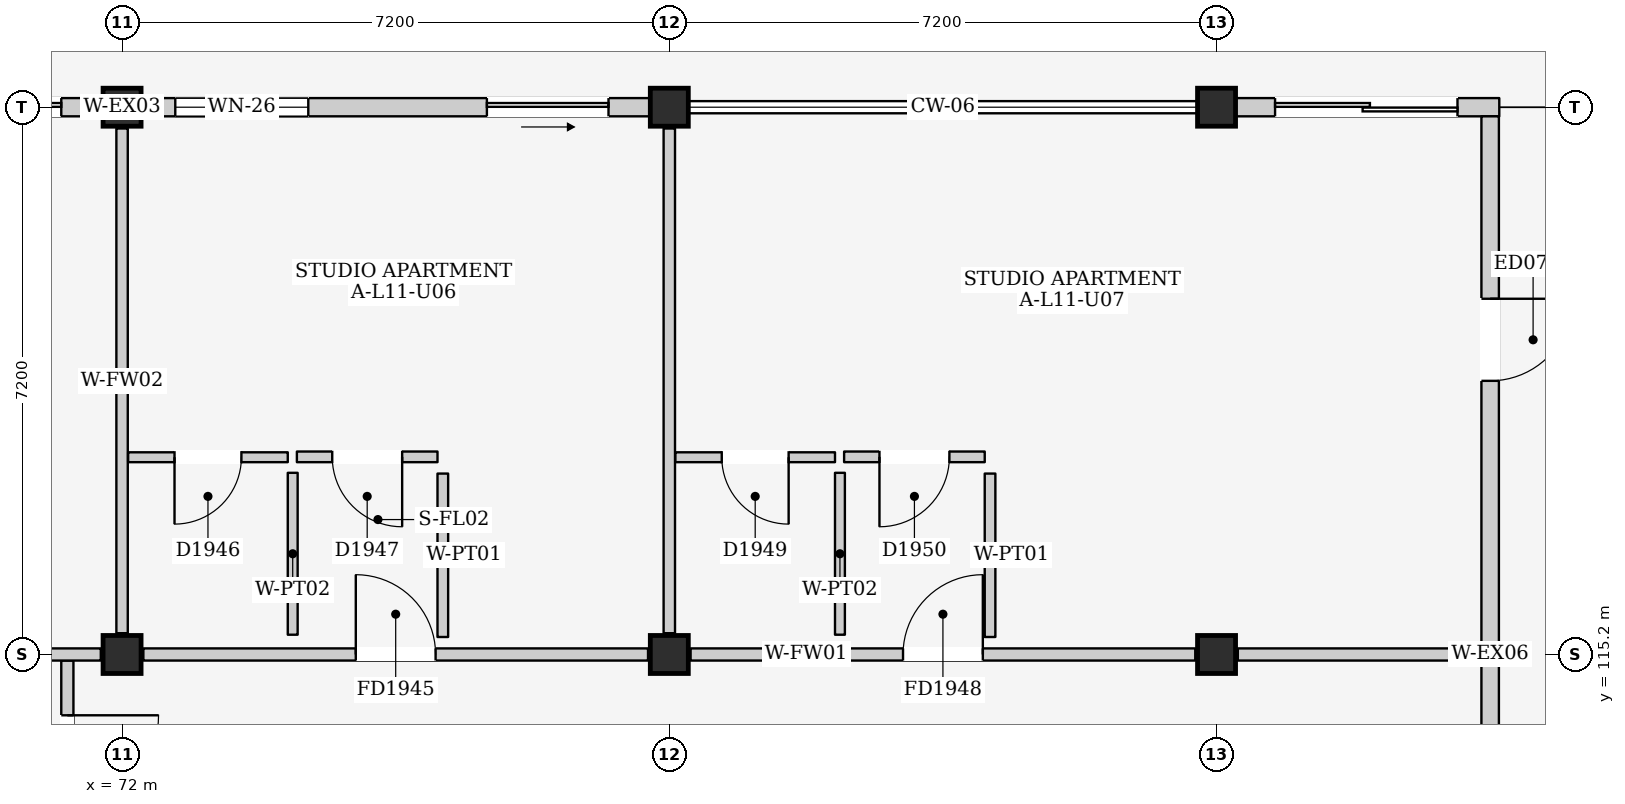
"""IFC4 building model, lengths in metres.
Left out: names, types, materials, properties, quantities, classifications, styles, units other than length and angle.
Written with IfcOpenShell. Run it as: python <this file> out.ifc"""

import sys

from ifc_helpers import new_model, si_unit, direction, frame, frame_2d, origin, origin_2d, place, context, subcontext, project, spatial, rectangle, extrude, element, fill, save


model = new_model("IFC4")
c1 = context("Model", 3, precision=1e-05, world=origin(), true_north=direction((0.0, 1.0)))
c2 = subcontext(c1, "Body", "Model", "MODEL_VIEW")
j1 = project(units=[si_unit("LENGTHUNIT", "METRE"), si_unit("PLANEANGLEUNIT", "RADIAN")], contexts=[c1])
p1 = place(None, origin())
s1 = spatial("IfcSite", under=j1, at=p1, CompositionType="ELEMENT")
p2 = place(p1, origin())
s2 = spatial("IfcBuilding", under=s1, at=p2, CompositionType="ELEMENT")
p3 = place(p2, frame((0.0, 0.0, 38.0)))
s3 = spatial("IfcBuildingStorey", under=s2, at=p3, CompositionType="ELEMENT", Elevation=38.0)
for number, where, z_axis, x_axis in (
    (1, (72.0, 115.2, 0.0), (0.0, 0.0, 1.0), (1.0, 0.0, 0.0)),
    (2, (72.0, 122.4, 0.0), (0.0, 0.0, 1.0), (1.0, 0.0, 0.0)),
    (3, (79.2, 115.2, 0.0), (0.0, 0.0, 1.0), (1.0, 0.0, 0.0)),
    (4, (79.2, 122.4, 0.0), (0.0, 0.0, 1.0), (1.0, 0.0, 0.0)),
    (5, (86.4, 115.2, 0.0), (0.0, 0.0, 1.0), (1.0, 0.0, 0.0)),
    (6, (86.4, 122.4, 0.0), (0.0, 0.0, 1.0), (1.0, 0.0, 0.0)),
):
    element("IfcColumn", number, at=place(p3, frame(where, z_axis=z_axis, x_axis=x_axis)), inside=s3, PredefinedType="COLUMN", context=c2, shape_type="SweptSolid", body=[
        extrude(rectangle(XDim=0.5, YDim=0.5, at=origin_2d()), origin(), (0.0, 0.0, 1.0), 3.2),
    ])
p4 = place(p3, frame((65.05, 122.4, 0.0), z_axis=(0.0, 0.0, 1.0), x_axis=(1.0, 0.0, 0.0)))
e7 = element("IfcWall", 7, at=p4, inside=s3, PredefinedType="ELEMENTEDWALL", context=c2, shape_type="SweptSolid", body=[
    extrude(rectangle(XDim=6.7, YDim=0.24, at=frame_2d((3.35, 0.0))), origin(), (0.0, 0.0, 1.0), 2.525),
])
p5 = place(p4, frame((4.35, 0.0, 0.0)))
e8 = element("IfcOpeningElement", 8, at=p5, cuts=e7, PredefinedType="OPENING", context=c2, shape_type="SweptSolid", body=[
    extrude(rectangle(XDim=1.8, YDim=2.12, at=frame_2d((0.9, 1.06))), frame((0.0, 0.135, 0.0), z_axis=(0.0, -1.0, 0.0), x_axis=(1.0, 0.0, 0.0)), (0.0, 0.0, 1.0), 0.27),
])
p6 = place(p4, frame((0.45, 0.0, 0.815)))
e9 = element("IfcOpeningElement", 9, at=p6, cuts=e7, PredefinedType="OPENING", context=c2, shape_type="SweptSolid", body=[
    extrude(rectangle(XDim=2.05, YDim=1.6, at=frame_2d((1.025, 0.8))), frame((0.0, 0.135, 0.0), z_axis=(0.0, -1.0, 0.0), x_axis=(1.0, 0.0, 0.0)), (0.0, 0.0, 1.0), 0.27),
])
p7 = place(p3, frame((72.25, 122.4, 0.0), z_axis=(0.0, 0.0, 1.0), x_axis=(1.0, 0.0, 0.0)))
e10 = element("IfcWall", 10, at=p7, inside=s3, PredefinedType="ELEMENTEDWALL", context=c2, shape_type="SweptSolid", body=[
    extrude(rectangle(XDim=6.7, YDim=0.24, at=frame_2d((3.35, 0.0))), origin(), (0.0, 0.0, 1.0), 2.525),
])
p8 = place(p7, frame((4.55, 0.0, 0.0)))
e11 = element("IfcOpeningElement", 11, at=p8, cuts=e10, PredefinedType="OPENING", context=c2, shape_type="SweptSolid", body=[
    extrude(rectangle(XDim=1.6, YDim=2.12, at=frame_2d((0.8, 1.06))), frame((0.0, 0.135, 0.0), z_axis=(0.0, -1.0, 0.0), x_axis=(1.0, 0.0, 0.0)), (0.0, 0.0, 1.0), 0.27),
])
p9 = place(p7, frame((0.45, 0.0, 0.865)))
e12 = element("IfcOpeningElement", 12, at=p9, cuts=e10, PredefinedType="OPENING", context=c2, shape_type="SweptSolid", body=[
    extrude(rectangle(XDim=1.75, YDim=1.55, at=frame_2d((0.875, 0.775))), frame((0.0, 0.135, 0.0), z_axis=(0.0, -1.0, 0.0), x_axis=(1.0, 0.0, 0.0)), (0.0, 0.0, 1.0), 0.27),
])
p10 = place(p3, frame((86.65, 122.4, 0.0), z_axis=(0.0, 0.0, 1.0), x_axis=(1.0, 0.0, 0.0)))
e13 = element("IfcWall", 13, at=p10, inside=s3, PredefinedType="ELEMENTEDWALL", context=c2, shape_type="SweptSolid", body=[
    extrude(rectangle(XDim=3.47, YDim=0.24, at=frame_2d((1.735, 0.0))), origin(), (0.0, 0.0, 1.0), 2.325),
])
p11 = place(p10, frame((0.52, 0.0, 0.0)))
e14 = element("IfcOpeningElement", 14, at=p11, cuts=e13, PredefinedType="OPENING", context=c2, shape_type="SweptSolid", body=[
    extrude(rectangle(XDim=2.4, YDim=2.12, at=frame_2d((1.2, 1.06))), frame((0.0, 0.135, 0.0), z_axis=(0.0, -1.0, 0.0), x_axis=(1.0, 0.0, 0.0)), (0.0, 0.0, 1.0), 0.27),
])
p12 = place(p3, frame((90.0, 108.12, 0.0), z_axis=(0.0, 0.0, 1.0), x_axis=(0.0, 1.0, 0.0)))
e15 = element("IfcWall", 15, at=p12, inside=s3, PredefinedType="ELEMENTEDWALL", context=c2, shape_type="SweptSolid", body=[
    extrude(rectangle(XDim=7.08, YDim=0.23, at=frame_2d((3.54, 0.0))), origin(), (0.0, 0.0, 1.0), 2.425),
])
p13 = place(p12, frame((2.75, 0.0, 1.1)))
e16 = element("IfcOpeningElement", 16, at=p13, cuts=e15, PredefinedType="OPENING", context=c2, shape_type="SweptSolid", body=[
    extrude(rectangle(XDim=1.0, YDim=0.9, at=frame_2d((0.5, 0.45))), frame((0.0, 0.13, 0.0), z_axis=(0.0, -1.0, 0.0), x_axis=(1.0, 0.0, 0.0)), (0.0, 0.0, 1.0), 0.26),
])
p14 = place(p3, frame((90.0, 115.2, 0.0), z_axis=(0.0, 0.0, 1.0), x_axis=(0.0, 1.0, 0.0)))
e17 = element("IfcWall", 17, at=p14, inside=s3, PredefinedType="ELEMENTEDWALL", context=c2, shape_type="SweptSolid", body=[
    extrude(rectangle(XDim=7.08, YDim=0.23, at=frame_2d((3.54, 0.0))), origin(), (0.0, 0.0, 1.0), 2.425),
])
p15 = place(p14, frame((3.6, 0.0, 0.0)))
e18 = element("IfcOpeningElement", 18, at=p15, cuts=e17, PredefinedType="OPENING", context=c2, shape_type="SweptSolid", body=[
    extrude(rectangle(XDim=1.08, YDim=2.12, at=frame_2d((0.54, 1.06))), frame((0.0, 0.13, 0.0), z_axis=(0.0, -1.0, 0.0), x_axis=(1.0, 0.0, 0.0)), (0.0, 0.0, 1.0), 0.26),
])
p16 = place(p3, frame((71.28, 110.8, 0.0), z_axis=(0.0, 0.0, 1.0), x_axis=(0.0, 1.0, 0.0)))
e19 = element("IfcWall", 19, at=p16, inside=s3, PredefinedType="PARTITIONING", context=c2, shape_type="SweptSolid", body=[
    extrude(rectangle(XDim=4.32, YDim=0.16, at=frame_2d((2.16, 0.0))), origin(), (0.0, 0.0, 1.0), 2.99),
])
p17 = place(p16, frame((2.4, 0.0, 0.0)))
e20 = element("IfcOpeningElement", 20, at=p17, cuts=e19, PredefinedType="OPENING", context=c2, shape_type="SweptSolid", body=[
    extrude(rectangle(XDim=1.2, YDim=2.2, at=frame_2d((0.6, 1.1))), frame((0.0, 0.095, 0.0), z_axis=(0.0, -1.0, 0.0), x_axis=(1.0, 0.0, 0.0)), (0.0, 0.0, 1.0), 0.19),
])
p18 = place(p3, frame((65.08, 115.2, 0.0), z_axis=(0.0, 0.0, 1.0), x_axis=(1.0, 0.0, 0.0)))
e21 = element("IfcWall", 21, at=p18, inside=s3, PredefinedType="PARTITIONING", context=c2, shape_type="SweptSolid", body=[
    extrude(rectangle(XDim=6.64, YDim=0.16, at=frame_2d((3.32, 0.0))), origin(), (0.0, 0.0, 1.0), 2.325),
])
p19 = place(p18, frame((2.795, 0.0, 0.0)))
e22 = element("IfcOpeningElement", 22, at=p19, cuts=e21, PredefinedType="OPENING", context=c2, shape_type="SweptSolid", body=[
    extrude(rectangle(XDim=1.05, YDim=2.15, at=frame_2d((0.525, 1.075))), frame((0.0, 0.095, 0.0), z_axis=(0.0, -1.0, 0.0), x_axis=(1.0, 0.0, 0.0)), (0.0, 0.0, 1.0), 0.19),
])
p20 = place(p3, frame((72.0, 115.48, 0.0), z_axis=(0.0, 0.0, 1.0), x_axis=(0.0, 1.0, 0.0)))
e23 = element("IfcWall", 23, at=p20, inside=s3, PredefinedType="PARTITIONING", context=c2, shape_type="SweptSolid", body=[
    extrude(rectangle(XDim=6.64, YDim=0.15, at=frame_2d((3.32, 0.0))), origin(), (0.0, 0.0, 1.0), 2.475),
])
p21 = place(p3, frame((72.28, 115.2, 0.0), z_axis=(0.0, 0.0, 1.0), x_axis=(1.0, 0.0, 0.0)))
e24 = element("IfcWall", 24, at=p21, inside=s3, PredefinedType="PARTITIONING", context=c2, shape_type="SweptSolid", body=[
    extrude(rectangle(XDim=6.64, YDim=0.16, at=frame_2d((3.32, 0.0))), origin(), (0.0, 0.0, 1.0), 2.325),
])
p22 = place(p21, frame((2.795, 0.0, 0.0)))
e25 = element("IfcOpeningElement", 25, at=p22, cuts=e24, PredefinedType="OPENING", context=c2, shape_type="SweptSolid", body=[
    extrude(rectangle(XDim=1.05, YDim=2.15, at=frame_2d((0.525, 1.075))), frame((0.0, 0.095, 0.0), z_axis=(0.0, -1.0, 0.0), x_axis=(1.0, 0.0, 0.0)), (0.0, 0.0, 1.0), 0.19),
])
p23 = place(p3, frame((79.2, 115.48, 0.0), z_axis=(0.0, 0.0, 1.0), x_axis=(0.0, 1.0, 0.0)))
e26 = element("IfcWall", 26, at=p23, inside=s3, PredefinedType="PARTITIONING", context=c2, shape_type="SweptSolid", body=[
    extrude(rectangle(XDim=6.64, YDim=0.15, at=frame_2d((3.32, 0.0))), origin(), (0.0, 0.0, 1.0), 2.475),
])
p24 = place(p3, frame((72.08, 117.795, 0.0), z_axis=(0.0, 0.0, 1.0), x_axis=(1.0, 0.0, 0.0)))
e27 = element("IfcWall", 27, at=p24, inside=s3, PredefinedType="PARTITIONING", context=c2, shape_type="SweptSolid", body=[
    extrude(rectangle(XDim=2.1, YDim=0.13, at=frame_2d((1.05, 0.0))), origin(), (0.0, 0.0, 1.0), 2.99),
])
p25 = place(p24, frame((0.61, 0.0, 0.0)))
e28 = element("IfcOpeningElement", 28, at=p25, cuts=e27, PredefinedType="OPENING", context=c2, shape_type="SweptSolid", body=[
    extrude(rectangle(XDim=0.88, YDim=2.1, at=frame_2d((0.44, 1.05))), frame((0.0, 0.08, 0.0), z_axis=(0.0, -1.0, 0.0), x_axis=(1.0, 0.0, 0.0)), (0.0, 0.0, 1.0), 0.16),
])
p26 = place(p3, frame((74.245, 115.46, 0.0), z_axis=(0.0, 0.0, 1.0), x_axis=(0.0, 1.0, 0.0)))
e29 = element("IfcWall", 29, at=p26, inside=s3, PredefinedType="PARTITIONING", context=c2, shape_type="SweptSolid", body=[
    extrude(rectangle(XDim=2.13, YDim=0.13, at=frame_2d((1.065, 0.0))), origin(), (0.0, 0.0, 1.0), 2.99),
])
p27 = place(p3, frame((74.3, 117.8, 0.0), z_axis=(0.0, 0.0, 1.0), x_axis=(1.0, 0.0, 0.0)))
e30 = element("IfcWall", 30, at=p27, inside=s3, PredefinedType="PARTITIONING", context=c2, shape_type="SweptSolid", body=[
    extrude(rectangle(XDim=1.85, YDim=0.14, at=frame_2d((0.925, 0.0))), origin(), (0.0, 0.0, 1.0), 2.99),
])
p28 = place(p27, frame((0.465, 0.0, 0.0)))
e31 = element("IfcOpeningElement", 31, at=p28, cuts=e30, PredefinedType="OPENING", context=c2, shape_type="SweptSolid", body=[
    extrude(rectangle(XDim=0.92, YDim=2.1, at=frame_2d((0.46, 1.05))), frame((0.0, 0.085, 0.0), z_axis=(0.0, -1.0, 0.0), x_axis=(1.0, 0.0, 0.0)), (0.0, 0.0, 1.0), 0.17),
])
p29 = place(p3, frame((76.22, 115.43, 0.0), z_axis=(0.0, 0.0, 1.0), x_axis=(0.0, 1.0, 0.0)))
e32 = element("IfcWall", 32, at=p29, inside=s3, PredefinedType="PARTITIONING", context=c2, shape_type="SweptSolid", body=[
    extrude(rectangle(XDim=2.15, YDim=0.14, at=frame_2d((1.075, 0.0))), origin(), (0.0, 0.0, 1.0), 2.99),
])
p30 = place(p3, frame((79.48, 115.2, 0.0), z_axis=(0.0, 0.0, 1.0), x_axis=(1.0, 0.0, 0.0)))
e33 = element("IfcWall", 33, at=p30, inside=s3, PredefinedType="PARTITIONING", context=c2, shape_type="SweptSolid", body=[
    extrude(rectangle(XDim=6.64, YDim=0.16, at=frame_2d((3.32, 0.0))), origin(), (0.0, 0.0, 1.0), 2.325),
])
p31 = place(p30, frame((2.795, 0.0, 0.0)))
e34 = element("IfcOpeningElement", 34, at=p31, cuts=e33, PredefinedType="OPENING", context=c2, shape_type="SweptSolid", body=[
    extrude(rectangle(XDim=1.05, YDim=2.15, at=frame_2d((0.525, 1.075))), frame((0.0, 0.095, 0.0), z_axis=(0.0, -1.0, 0.0), x_axis=(1.0, 0.0, 0.0)), (0.0, 0.0, 1.0), 0.19),
])
p32 = place(p3, frame((86.68, 115.2, 0.0), z_axis=(0.0, 0.0, 1.0), x_axis=(1.0, 0.0, 0.0)))
e35 = element("IfcWall", 35, at=p32, inside=s3, PredefinedType="PARTITIONING", context=c2, shape_type="SweptSolid", body=[
    extrude(rectangle(XDim=3.04, YDim=0.16, at=frame_2d((1.52, 0.0))), origin(), (0.0, 0.0, 1.0), 2.325),
])
p33 = place(p3, frame((79.28, 117.795, 0.0), z_axis=(0.0, 0.0, 1.0), x_axis=(1.0, 0.0, 0.0)))
e36 = element("IfcWall", 36, at=p33, inside=s3, PredefinedType="PARTITIONING", context=c2, shape_type="SweptSolid", body=[
    extrude(rectangle(XDim=2.1, YDim=0.13, at=frame_2d((1.05, 0.0))), origin(), (0.0, 0.0, 1.0), 2.99),
])
p34 = place(p33, frame((0.61, 0.0, 0.0)))
e37 = element("IfcOpeningElement", 37, at=p34, cuts=e36, PredefinedType="OPENING", context=c2, shape_type="SweptSolid", body=[
    extrude(rectangle(XDim=0.88, YDim=2.1, at=frame_2d((0.44, 1.05))), frame((0.0, 0.08, 0.0), z_axis=(0.0, -1.0, 0.0), x_axis=(1.0, 0.0, 0.0)), (0.0, 0.0, 1.0), 0.16),
])
p35 = place(p3, frame((81.445, 115.46, 0.0), z_axis=(0.0, 0.0, 1.0), x_axis=(0.0, 1.0, 0.0)))
e38 = element("IfcWall", 38, at=p35, inside=s3, PredefinedType="PARTITIONING", context=c2, shape_type="SweptSolid", body=[
    extrude(rectangle(XDim=2.13, YDim=0.13, at=frame_2d((1.065, 0.0))), origin(), (0.0, 0.0, 1.0), 2.99),
])
p36 = place(p3, frame((81.5, 117.8, 0.0), z_axis=(0.0, 0.0, 1.0), x_axis=(1.0, 0.0, 0.0)))
e39 = element("IfcWall", 39, at=p36, inside=s3, PredefinedType="PARTITIONING", context=c2, shape_type="SweptSolid", body=[
    extrude(rectangle(XDim=1.85, YDim=0.14, at=frame_2d((0.925, 0.0))), origin(), (0.0, 0.0, 1.0), 2.99),
])
p37 = place(p36, frame((0.465, 0.0, 0.0)))
e40 = element("IfcOpeningElement", 40, at=p37, cuts=e39, PredefinedType="OPENING", context=c2, shape_type="SweptSolid", body=[
    extrude(rectangle(XDim=0.92, YDim=2.1, at=frame_2d((0.46, 1.05))), frame((0.0, 0.085, 0.0), z_axis=(0.0, -1.0, 0.0), x_axis=(1.0, 0.0, 0.0)), (0.0, 0.0, 1.0), 0.17),
])
p38 = place(p3, frame((83.42, 115.43, 0.0), z_axis=(0.0, 0.0, 1.0), x_axis=(0.0, 1.0, 0.0)))
e41 = element("IfcWall", 41, at=p38, inside=s3, PredefinedType="PARTITIONING", context=c2, shape_type="SweptSolid", body=[
    extrude(rectangle(XDim=2.15, YDim=0.14, at=frame_2d((1.075, 0.0))), origin(), (0.0, 0.0, 1.0), 2.99),
])
p39 = place(p5, frame((1.8, 0.0, 0.0), z_axis=(0.0, 0.0, 1.0), x_axis=(-1.0, 0.0, 0.0)))
e42 = element("IfcDoor", 42, at=p39, inside=s3, OperationType="SLIDING_TO_LEFT", PredefinedType="DOOR", context=c2, shape_type="SweptSolid", body=[
    extrude(rectangle(XDim=1.8, YDim=2.12, at=frame_2d((0.9, 1.06))), frame((0.0, 0.025, 0.0), z_axis=(0.0, -1.0, 0.0), x_axis=(1.0, 0.0, 0.0)), (0.0, 0.0, 1.0), 0.05),
])
fill(e8, e42)
p40 = place(p8, frame((1.6, 0.0, 0.0), z_axis=(0.0, 0.0, 1.0), x_axis=(-1.0, 0.0, 0.0)))
e43 = element("IfcDoor", 43, at=p40, inside=s3, OperationType="SLIDING_TO_RIGHT", PredefinedType="DOOR", context=c2, shape_type="SweptSolid", body=[
    extrude(rectangle(XDim=1.6, YDim=2.12, at=frame_2d((0.8, 1.06))), frame((0.0, 0.025, 0.0), z_axis=(0.0, -1.0, 0.0), x_axis=(1.0, 0.0, 0.0)), (0.0, 0.0, 1.0), 0.05),
])
fill(e11, e43)
p41 = place(p9, origin())
e44 = element("IfcWindow", 44, at=p41, inside=s3, PartitioningType="DOUBLE_PANEL_VERTICAL", PredefinedType="WINDOW", context=c2, shape_type="SweptSolid", body=[
    extrude(rectangle(XDim=1.75, YDim=1.55, at=frame_2d((0.875, 0.775))), frame((0.0, 0.03, 0.0), z_axis=(0.0, -1.0, 0.0), x_axis=(1.0, 0.0, 0.0)), (0.0, 0.0, 1.0), 0.06),
])
fill(e12, e44)
p42 = place(p11, frame((2.4, 0.0, 0.0), z_axis=(0.0, 0.0, 1.0), x_axis=(-1.0, 0.0, 0.0)))
e45 = element("IfcDoor", 45, at=p42, inside=s3, OperationType="DOUBLE_DOOR_SLIDING", PredefinedType="DOOR", context=c2, shape_type="SweptSolid", body=[
    extrude(rectangle(XDim=2.4, YDim=2.12, at=frame_2d((1.2, 1.06))), frame((0.0, 0.025, 0.0), z_axis=(0.0, -1.0, 0.0), x_axis=(1.0, 0.0, 0.0)), (0.0, 0.0, 1.0), 0.05),
])
fill(e14, e45)
p43 = place(p15, frame((1.08, 0.0, 0.0), z_axis=(0.0, 0.0, 1.0), x_axis=(-1.0, 0.0, 0.0)))
e46 = element("IfcDoor", 46, at=p43, inside=s3, OperationType="SINGLE_SWING_LEFT", PredefinedType="DOOR", context=c2, shape_type="SweptSolid", body=[
    extrude(rectangle(XDim=1.08, YDim=2.12, at=frame_2d((0.54, 1.06))), frame((0.0, 0.025, 0.0), z_axis=(0.0, -1.0, 0.0), x_axis=(1.0, 0.0, 0.0)), (0.0, 0.0, 1.0), 0.05),
])
fill(e18, e46)
p44 = place(p17, frame((1.2, 0.0, 0.0), z_axis=(0.0, 0.0, 1.0), x_axis=(-1.0, 0.0, 0.0)))
e47 = element("IfcDoor", 47, at=p44, inside=s3, OperationType="SINGLE_SWING_LEFT", PredefinedType="DOOR", context=c2, shape_type="SweptSolid", body=[
    extrude(rectangle(XDim=1.2, YDim=2.2, at=frame_2d((0.6, 1.1))), frame((0.0, 0.025, 0.0), z_axis=(0.0, -1.0, 0.0), x_axis=(1.0, 0.0, 0.0)), (0.0, 0.0, 1.0), 0.05),
])
fill(e20, e47)
p45 = place(p22, origin())
e48 = element("IfcDoor", 48, at=p45, inside=s3, OperationType="SINGLE_SWING_LEFT", PredefinedType="DOOR", context=c2, shape_type="SweptSolid", body=[
    extrude(rectangle(XDim=1.05, YDim=2.15, at=frame_2d((0.525, 1.075))), frame((0.0, 0.025, 0.0), z_axis=(0.0, -1.0, 0.0), x_axis=(1.0, 0.0, 0.0)), (0.0, 0.0, 1.0), 0.05),
])
fill(e25, e48)
p46 = place(p25, frame((0.88, 0.0, 0.0), z_axis=(0.0, 0.0, 1.0), x_axis=(-1.0, 0.0, 0.0)))
e49 = element("IfcDoor", 49, at=p46, inside=s3, OperationType="SINGLE_SWING_RIGHT", PredefinedType="DOOR", context=c2, shape_type="SweptSolid", body=[
    extrude(rectangle(XDim=0.88, YDim=2.1, at=frame_2d((0.44, 1.05))), frame((0.0, 0.025, 0.0), z_axis=(0.0, -1.0, 0.0), x_axis=(1.0, 0.0, 0.0)), (0.0, 0.0, 1.0), 0.05),
])
fill(e28, e49)
p47 = place(p28, frame((0.92, 0.0, 0.0), z_axis=(0.0, 0.0, 1.0), x_axis=(-1.0, 0.0, 0.0)))
e50 = element("IfcDoor", 50, at=p47, inside=s3, OperationType="SINGLE_SWING_LEFT", PredefinedType="DOOR", context=c2, shape_type="SweptSolid", body=[
    extrude(rectangle(XDim=0.92, YDim=2.1, at=frame_2d((0.46, 1.05))), frame((0.0, 0.025, 0.0), z_axis=(0.0, -1.0, 0.0), x_axis=(1.0, 0.0, 0.0)), (0.0, 0.0, 1.0), 0.05),
])
fill(e31, e50)
p48 = place(p31, origin())
e51 = element("IfcDoor", 51, at=p48, inside=s3, OperationType="SINGLE_SWING_RIGHT", PredefinedType="DOOR", context=c2, shape_type="SweptSolid", body=[
    extrude(rectangle(XDim=1.05, YDim=2.15, at=frame_2d((0.525, 1.075))), frame((0.0, 0.025, 0.0), z_axis=(0.0, -1.0, 0.0), x_axis=(1.0, 0.0, 0.0)), (0.0, 0.0, 1.0), 0.05),
])
fill(e34, e51)
p49 = place(p34, frame((0.88, 0.0, 0.0), z_axis=(0.0, 0.0, 1.0), x_axis=(-1.0, 0.0, 0.0)))
e52 = element("IfcDoor", 52, at=p49, inside=s3, OperationType="SINGLE_SWING_LEFT", PredefinedType="DOOR", context=c2, shape_type="SweptSolid", body=[
    extrude(rectangle(XDim=0.88, YDim=2.1, at=frame_2d((0.44, 1.05))), frame((0.0, 0.025, 0.0), z_axis=(0.0, -1.0, 0.0), x_axis=(1.0, 0.0, 0.0)), (0.0, 0.0, 1.0), 0.05),
])
fill(e37, e52)
p50 = place(p37, frame((0.92, 0.0, 0.0), z_axis=(0.0, 0.0, 1.0), x_axis=(-1.0, 0.0, 0.0)))
e53 = element("IfcDoor", 53, at=p50, inside=s3, OperationType="SINGLE_SWING_RIGHT", PredefinedType="DOOR", context=c2, shape_type="SweptSolid", body=[
    extrude(rectangle(XDim=0.92, YDim=2.1, at=frame_2d((0.46, 1.05))), frame((0.0, 0.025, 0.0), z_axis=(0.0, -1.0, 0.0), x_axis=(1.0, 0.0, 0.0)), (0.0, 0.0, 1.0), 0.05),
])
fill(e40, e53)
save(model, sys.argv[1])
